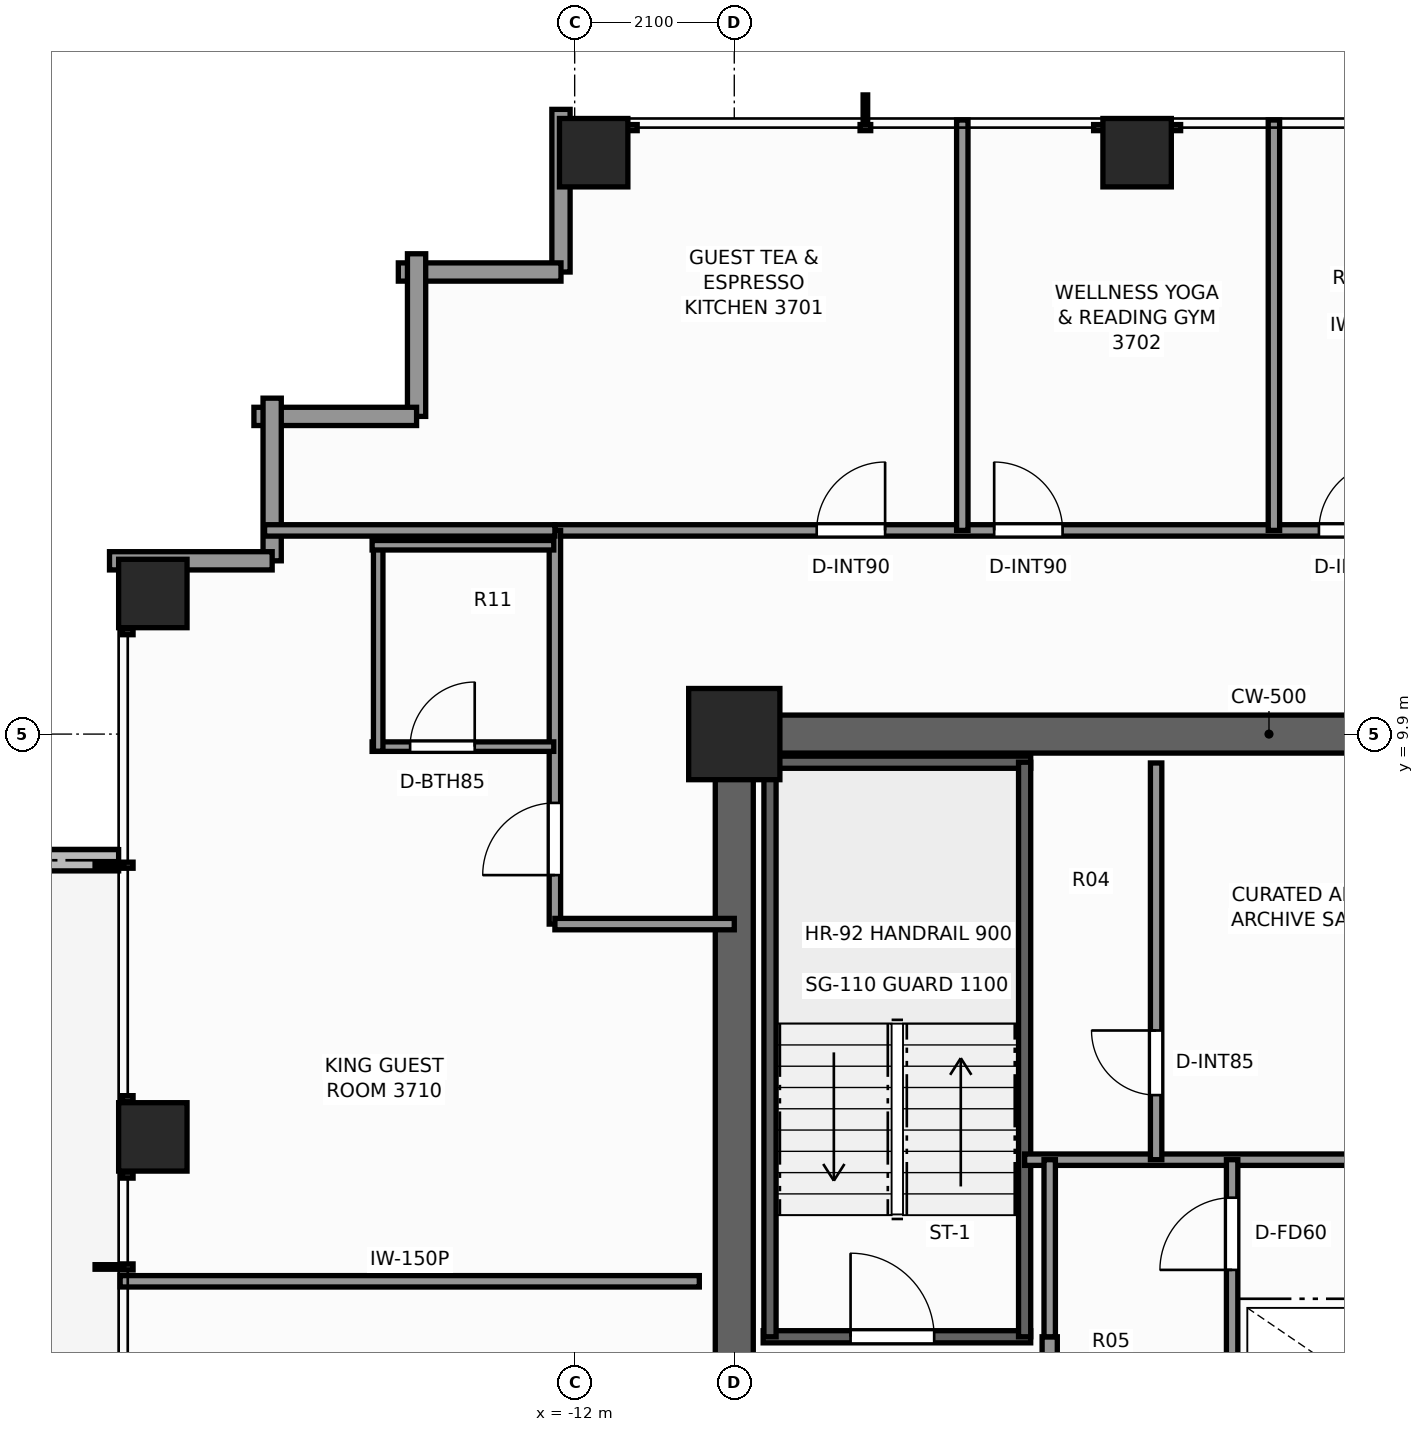
"""IFC4 building model, lengths in metres.
Left out: names, types, materials, properties, quantities, classifications, styles, units other than length and angle.
Written with IfcOpenShell. Run it as: python <this file> out.ifc"""

import sys

from ifc_helpers import new_model, si_unit, direction, frame, frame_2d, origin, origin_2d, place, context, subcontext, project, spatial, rectangle, extrude, element, fill, save


model = new_model("IFC4")
c1 = context("Model", 3, precision=1e-05, world=origin(), true_north=direction((0.0, 1.0)))
c2 = subcontext(c1, "Body", "Model", "MODEL_VIEW")
j1 = project(units=[si_unit("LENGTHUNIT", "METRE"), si_unit("PLANEANGLEUNIT", "RADIAN")], contexts=[c1])
p1 = place(None, origin())
s1 = spatial("IfcSite", under=j1, at=p1, CompositionType="ELEMENT")
p2 = place(p1, origin())
s2 = spatial("IfcBuilding", under=s1, at=p2, CompositionType="ELEMENT")
p3 = place(p2, frame((0.0, 0.0, 128.3)))
s3 = spatial("IfcBuildingStorey", under=s2, at=p3, CompositionType="ELEMENT", Elevation=128.3)
p4 = place(p3, frame((-10.15, 9.9, 0.0), z_axis=(0.0, 0.0, 1.0), x_axis=(1.0, 0.0, 0.0)))
e1 = element("IfcWall", 1, at=p4, inside=s3, PredefinedType="SHEAR", context=c2, shape_type="SweptSolid", body=[
    extrude(rectangle(XDim=14.57, YDim=0.5, at=frame_2d((7.285, 0.0))), origin(), (0.0, 0.0, 1.0), 3.3),
])
p5 = place(p3, frame((-9.9, -3.7, 0.0), z_axis=(0.0, 0.0, 1.0), x_axis=(0.0, 1.0, 0.0)))
e2 = element("IfcWall", 2, at=p5, inside=s3, PredefinedType="SHEAR", context=c2, shape_type="SweptSolid", body=[
    extrude(rectangle(XDim=13.35, YDim=0.5, at=frame_2d((6.675, 0.0))), origin(), (0.0, 0.0, 1.0), 3.3),
])
p6 = place(p5, frame((0.35, 0.0, 0.0)))
e3 = element("IfcOpeningElement", 3, at=p6, cuts=e2, PredefinedType="OPENING", context=c2, shape_type="SweptSolid", body=[
    extrude(rectangle(XDim=1.1, YDim=2.2, at=frame_2d((0.55, 1.1))), frame((0.0, 0.26, 0.0), z_axis=(0.0, -1.0, 0.0), x_axis=(1.0, 0.0, 0.0)), (0.0, 0.0, 1.0), 0.52),
])
p7 = place(p3, frame((-9.9, 9.9, 0.0), z_axis=(0.0, 0.0, 1.0), x_axis=(1.0, 0.0, 0.0)))
e4 = element("IfcColumn", 4, at=p7, inside=s3, PredefinedType="COLUMN", context=c2, shape_type="SweptSolid", body=[
    extrude(rectangle(XDim=1.2, YDim=1.2, at=origin_2d()), origin(), (0.0, 0.0, 1.0), 3.3),
])
for number, where, z_axis, x_axis in (
    (5, (-11.75, 17.55, 0.0), (0.0, 0.0, 1.0), (1.0, 0.0, 0.0)),
    (6, (-4.6, 17.55, 0.0), (0.0, 0.0, 1.0), (1.0, 0.0, 0.0)),
    (7, (-17.55, 4.6, 0.0), (0.0, 0.0, 1.0), (1.0, 0.0, 0.0)),
    (8, (-17.55, 11.75, 0.0), (0.0, 0.0, 1.0), (1.0, 0.0, 0.0)),
):
    element("IfcColumn", number, at=place(p3, frame(where, z_axis=z_axis, x_axis=x_axis)), inside=s3, PredefinedType="COLUMN", context=c2, shape_type="SweptSolid", body=[
        extrude(rectangle(XDim=0.9, YDim=0.9, at=origin_2d()), origin(), (0.0, 0.0, 1.0), 3.3),
    ])
p8 = place(p3, frame((-18.0, 8.24, -0.02), z_axis=(0.0, 0.0, 1.0), x_axis=(-1.0, 0.0, 0.0)))
e9 = element("IfcWall", 9, at=p8, inside=s3, PredefinedType="PARAPET", context=c2, shape_type="SweptSolid", body=[
    extrude(rectangle(XDim=2.006, YDim=0.28, at=frame_2d((1.003, 0.0))), origin(), (0.0, 0.0, 1.0), 0.42),
])
for number, where, z_axis, x_axis in (
    (10, (-12.18, 15.98, 0.0), (0.0, 0.0, 1.0), (0.0, 1.0, 0.0)),
    (11, (-14.32, 15.98, 0.0), (0.0, 0.0, 1.0), (1.0, 0.0, 0.0)),
):
    element("IfcWall", number, at=place(p3, frame(where, z_axis=z_axis, x_axis=x_axis)), inside=s3, PredefinedType="STANDARD", context=c2, shape_type="SweptSolid", body=[
        extrude(rectangle(XDim=2.14, YDim=0.24, at=frame_2d((1.07, 0.0))), origin(), (0.0, 0.0, 1.0), 2.479),
    ])
for number, where, z_axis, x_axis in (
    (12, (-14.08, 14.08, 0.0), (0.0, 0.0, 1.0), (0.0, 1.0, 0.0)),
    (13, (-16.22, 14.08, 0.0), (0.0, 0.0, 1.0), (1.0, 0.0, 0.0)),
):
    element("IfcWall", number, at=place(p3, frame(where, z_axis=z_axis, x_axis=x_axis)), inside=s3, PredefinedType="STANDARD", context=c2, shape_type="SweptSolid", body=[
        extrude(rectangle(XDim=2.14, YDim=0.24, at=frame_2d((1.07, 0.0))), origin(), (0.0, 0.0, 1.0), 2.479),
    ])
for number, where, z_axis, x_axis in (
    (14, (-15.98, 12.18, 0.0), (0.0, 0.0, 1.0), (0.0, 1.0, 0.0)),
    (15, (-18.12, 12.18, 0.0), (0.0, 0.0, 1.0), (1.0, 0.0, 0.0)),
):
    element("IfcWall", number, at=place(p3, frame(where, z_axis=z_axis, x_axis=x_axis)), inside=s3, PredefinedType="STANDARD", context=c2, shape_type="SweptSolid", body=[
        extrude(rectangle(XDim=2.14, YDim=0.24, at=frame_2d((1.07, 0.0))), origin(), (0.0, 0.0, 1.0), 2.479),
    ])
p9 = place(p3, frame((-9.52, 1.97, 0.0), z_axis=(0.0, 0.0, 1.0), x_axis=(1.0, 0.0, 0.0)))
e16 = element("IfcWall", 16, at=p9, inside=s3, PredefinedType="SHEAR", context=c2, shape_type="SweptSolid", body=[
    extrude(rectangle(XDim=3.52, YDim=0.16, at=frame_2d((1.76, 0.0))), origin(), (0.0, 0.0, 1.0), 3.3),
])
p10 = place(p9, frame((1.15, 0.0, 0.0)))
e17 = element("IfcOpeningElement", 17, at=p10, cuts=e16, PredefinedType="OPENING", context=c2, shape_type="SweptSolid", body=[
    extrude(rectangle(XDim=1.1, YDim=2.2, at=frame_2d((0.55, 1.1))), frame((0.0, 0.09, 0.0), z_axis=(0.0, -1.0, 0.0), x_axis=(1.0, 0.0, 0.0)), (0.0, 0.0, 1.0), 0.18),
])
p11 = place(p3, frame((-9.52, 9.53, 0.0), z_axis=(0.0, 0.0, 1.0), x_axis=(1.0, 0.0, 0.0)))
e18 = element("IfcWall", 18, at=p11, inside=s3, PredefinedType="SHEAR", context=c2, shape_type="SweptSolid", body=[
    extrude(rectangle(XDim=3.52, YDim=0.16, at=frame_2d((1.76, 0.0))), origin(), (0.0, 0.0, 1.0), 3.3),
])
for number, where, z_axis, x_axis in (
    (19, (-9.43, 1.97, 0.0), (0.0, 0.0, 1.0), (0.0, 1.0, 0.0)),
    (20, (-6.08, 1.97, 0.0), (0.0, 0.0, 1.0), (0.0, 1.0, 0.0)),
):
    element("IfcWall", number, at=place(p3, frame(where, z_axis=z_axis, x_axis=x_axis)), inside=s3, PredefinedType="SHEAR", context=c2, shape_type="SweptSolid", body=[
        extrude(rectangle(XDim=7.56, YDim=0.16, at=frame_2d((3.78, 0.0))), origin(), (0.0, 0.0, 1.0), 3.3),
    ])
p12 = place(p3, frame((-5.75, -3.6, 0.0), z_axis=(0.0, 0.0, 1.0), x_axis=(0.0, 1.0, 0.0)))
e21 = element("IfcWall", 21, at=p12, inside=s3, PredefinedType="SOLIDWALL", context=c2, shape_type="SweptSolid", body=[
    extrude(rectangle(XDim=5.57, YDim=0.2, at=frame_2d((2.785, 0.0))), origin(), (0.0, 0.0, 1.0), 2.735),
])
p13 = place(p12, frame((2.75, 0.0, 0.0)))
e22 = element("IfcOpeningElement", 22, at=p13, cuts=e21, PredefinedType="OPENING", context=c2, shape_type="SweptSolid", body=[
    extrude(rectangle(XDim=1.1, YDim=2.2, at=frame_2d((0.55, 1.1))), frame((0.0, 0.11, 0.0), z_axis=(0.0, -1.0, 0.0), x_axis=(1.0, 0.0, 0.0)), (0.0, 0.0, 1.0), 0.22),
])
p14 = place(p3, frame((-6.08, 4.3, 0.0), z_axis=(0.0, 0.0, 1.0), x_axis=(1.0, 0.0, 0.0)))
e23 = element("IfcWall", 23, at=p14, inside=s3, PredefinedType="PARTITIONING", context=c2, shape_type="SweptSolid", body=[
    extrude(rectangle(XDim=6.3, YDim=0.15, at=frame_2d((3.15, 0.0))), origin(), (0.0, 0.0, 1.0), 3.1),
])
p15 = place(p3, frame((-4.35, 4.3, 0.0), z_axis=(0.0, 0.0, 1.0), x_axis=(0.0, 1.0, 0.0)))
e24 = element("IfcWall", 24, at=p15, inside=s3, PredefinedType="PARTITIONING", context=c2, shape_type="SweptSolid", body=[
    extrude(rectangle(XDim=5.22, YDim=0.15, at=frame_2d((2.61, 0.0))), origin(), (0.0, 0.0, 1.0), 3.1),
])
p16 = place(p15, frame((0.85, 0.0, 0.0)))
e25 = element("IfcOpeningElement", 25, at=p16, cuts=e24, PredefinedType="OPENING", context=c2, shape_type="SweptSolid", body=[
    extrude(rectangle(XDim=0.85, YDim=2.03, at=frame_2d((0.425, 1.015))), frame((0.0, 0.085, 0.0), z_axis=(0.0, -1.0, 0.0), x_axis=(1.0, 0.0, 0.0)), (0.0, 0.0, 1.0), 0.17),
])
p17 = place(p3, frame((-3.35, 1.1, 0.0), z_axis=(0.0, 0.0, 1.0), x_axis=(0.0, 1.0, 0.0)))
e26 = element("IfcWall", 26, at=p17, inside=s3, PredefinedType="PARTITIONING", context=c2, shape_type="SweptSolid", body=[
    extrude(rectangle(XDim=3.2, YDim=0.15, at=frame_2d((1.6, 0.0))), origin(), (0.0, 0.0, 1.0), 2.735),
])
p18 = place(p17, frame((1.75, 0.0, 0.0)))
e27 = element("IfcOpeningElement", 27, at=p18, cuts=e26, PredefinedType="OPENING", context=c2, shape_type="SweptSolid", body=[
    extrude(rectangle(XDim=0.95, YDim=2.06, at=frame_2d((0.475, 1.03))), frame((0.0, 0.085, 0.0), z_axis=(0.0, -1.0, 0.0), x_axis=(1.0, 0.0, 0.0)), (0.0, 0.0, 1.0), 0.17),
])
p19 = place(p3, frame((-5.75, 1.97, 0.0), z_axis=(0.0, 0.0, 1.0), x_axis=(0.0, 1.0, 0.0)))
e28 = element("IfcWall", 28, at=p19, inside=s3, PredefinedType="PARTITIONING", context=c2, shape_type="SweptSolid", body=[
    extrude(rectangle(XDim=2.33, YDim=0.15, at=frame_2d((1.165, 0.0))), origin(), (0.0, 0.0, 1.0), 2.735),
])
p20 = place(p3, frame((-12.26, 12.58, 0.0), z_axis=(0.0, 0.0, 1.0), x_axis=(1.0, 0.0, 0.0)))
e29 = element("IfcWall", 29, at=p20, inside=s3, PredefinedType="PARTITIONING", context=c2, shape_type="SweptSolid", body=[
    extrude(rectangle(XDim=24.68, YDim=0.15, at=frame_2d((12.34, 0.0))), origin(), (0.0, 0.0, 1.0), 2.312),
])
p21 = place(p20, frame((3.444, 0.0, 0.0)))
e30 = element("IfcOpeningElement", 30, at=p21, cuts=e29, PredefinedType="OPENING", context=c2, shape_type="SweptSolid", body=[
    extrude(rectangle(XDim=0.9, YDim=2.06, at=frame_2d((0.45, 1.03))), frame((0.0, 0.085, 0.0), z_axis=(0.0, -1.0, 0.0), x_axis=(1.0, 0.0, 0.0)), (0.0, 0.0, 1.0), 0.17),
])
p22 = place(p20, frame((5.779, 0.0, 0.0)))
e31 = element("IfcOpeningElement", 31, at=p22, cuts=e29, PredefinedType="OPENING", context=c2, shape_type="SweptSolid", body=[
    extrude(rectangle(XDim=0.9, YDim=2.06, at=frame_2d((0.45, 1.03))), frame((0.0, 0.085, 0.0), z_axis=(0.0, -1.0, 0.0), x_axis=(1.0, 0.0, 0.0)), (0.0, 0.0, 1.0), 0.17),
])
p23 = place(p20, frame((10.052, 0.0, 0.0)))
e32 = element("IfcOpeningElement", 32, at=p23, cuts=e29, PredefinedType="OPENING", context=c2, shape_type="SweptSolid", body=[
    extrude(rectangle(XDim=0.9, YDim=2.06, at=frame_2d((0.45, 1.03))), frame((0.0, 0.085, 0.0), z_axis=(0.0, -1.0, 0.0), x_axis=(1.0, 0.0, 0.0)), (0.0, 0.0, 1.0), 0.17),
])
p24 = place(p20, frame((13.179, 0.0, 0.0)))
e33 = element("IfcOpeningElement", 33, at=p24, cuts=e29, PredefinedType="OPENING", context=c2, shape_type="SweptSolid", body=[
    extrude(rectangle(XDim=0.95, YDim=2.06, at=frame_2d((0.475, 1.03))), frame((0.0, 0.085, 0.0), z_axis=(0.0, -1.0, 0.0), x_axis=(1.0, 0.0, 0.0)), (0.0, 0.0, 1.0), 0.17),
])
p25 = place(p20, frame((16.518, 0.0, 0.0)))
e34 = element("IfcOpeningElement", 34, at=p25, cuts=e29, PredefinedType="OPENING", context=c2, shape_type="SweptSolid", body=[
    extrude(rectangle(XDim=0.9, YDim=2.06, at=frame_2d((0.45, 1.03))), frame((0.0, 0.085, 0.0), z_axis=(0.0, -1.0, 0.0), x_axis=(1.0, 0.0, 0.0)), (0.0, 0.0, 1.0), 0.17),
])
p26 = place(p20, frame((19.999, 0.0, 0.0)))
e35 = element("IfcOpeningElement", 35, at=p26, cuts=e29, PredefinedType="OPENING", context=c2, shape_type="SweptSolid", body=[
    extrude(rectangle(XDim=0.9, YDim=2.06, at=frame_2d((0.45, 1.03))), frame((0.0, 0.085, 0.0), z_axis=(0.0, -1.0, 0.0), x_axis=(1.0, 0.0, 0.0)), (0.0, 0.0, 1.0), 0.17),
])
p27 = place(p3, frame((-12.26, 7.4, 0.0), z_axis=(0.0, 0.0, 1.0), x_axis=(0.0, 1.0, 0.0)))
e36 = element("IfcWall", 36, at=p27, inside=s3, PredefinedType="PARTITIONING", context=c2, shape_type="SweptSolid", body=[
    extrude(rectangle(XDim=5.18, YDim=0.15, at=frame_2d((2.59, 0.0))), origin(), (0.0, 0.0, 1.0), 2.312),
])
p28 = place(p27, frame((0.645, 0.0, 0.0)))
e37 = element("IfcOpeningElement", 37, at=p28, cuts=e36, PredefinedType="OPENING", context=c2, shape_type="SweptSolid", body=[
    extrude(rectangle(XDim=0.95, YDim=2.06, at=frame_2d((0.475, 1.03))), frame((0.0, 0.085, 0.0), z_axis=(0.0, -1.0, 0.0), x_axis=(1.0, 0.0, 0.0)), (0.0, 0.0, 1.0), 0.17),
])
p29 = place(p3, frame((-12.26, 7.4, 0.0), z_axis=(0.0, 0.0, 1.0), x_axis=(1.0, 0.0, 0.0)))
e38 = element("IfcWall", 38, at=p29, inside=s3, PredefinedType="PARTITIONING", context=c2, shape_type="SweptSolid", body=[
    extrude(rectangle(XDim=2.36, YDim=0.15, at=frame_2d((1.18, 0.0))), origin(), (0.0, 0.0, 1.0), 3.1),
])
p30 = place(p3, frame((-16.08, 12.58, 0.0), z_axis=(0.0, 0.0, 1.0), x_axis=(1.0, 0.0, 0.0)))
e39 = element("IfcWall", 39, at=p30, inside=s3, PredefinedType="PARTITIONING", context=c2, shape_type="SweptSolid", body=[
    extrude(rectangle(XDim=3.82, YDim=0.15, at=frame_2d((1.91, 0.0))), origin(), (0.0, 0.0, 1.0), 3.1),
])
for number, where, z_axis, x_axis in (
    (40, (-6.9, 12.58, 0.0), (0.0, 0.0, 1.0), (0.0, 1.0, 0.0)),
    (41, (-2.8, 12.58, 0.0), (0.0, 0.0, 1.0), (0.0, 1.0, 0.0)),
):
    element("IfcWall", number, at=place(p3, frame(where, z_axis=z_axis, x_axis=x_axis)), inside=s3, PredefinedType="PARTITIONING", context=c2, shape_type="SweptSolid", body=[
        extrude(rectangle(XDim=5.4, YDim=0.15, at=frame_2d((2.7, 0.0))), origin(), (0.0, 0.0, 1.0), 2.469),
    ])
p31 = place(p3, frame((-17.98, 2.7, 0.0), z_axis=(0.0, 0.0, 1.0), x_axis=(1.0, 0.0, 0.0)))
e42 = element("IfcWall", 42, at=p31, inside=s3, PredefinedType="PARTITIONING", context=c2, shape_type="SweptSolid", body=[
    extrude(rectangle(XDim=7.62, YDim=0.15, at=frame_2d((3.81, 0.0))), origin(), (0.0, 0.0, 1.0), 2.469),
])
p32 = place(p3, frame((-14.665, 9.735, 0.0), z_axis=(0.0, 0.0, 1.0), x_axis=(1.0, 0.0, 0.0)))
e43 = element("IfcWall", 43, at=p32, inside=s3, PredefinedType="PARTITIONING", context=c2, shape_type="SweptSolid", body=[
    extrude(rectangle(XDim=2.39, YDim=0.125, at=frame_2d((1.195, 0.0))), origin(), (0.0, 0.0, 1.0), 3.1),
])
p33 = place(p32, frame((0.5, 0.0, 0.0)))
e44 = element("IfcOpeningElement", 44, at=p33, cuts=e43, PredefinedType="OPENING", context=c2, shape_type="SweptSolid", body=[
    extrude(rectangle(XDim=0.85, YDim=2.03, at=frame_2d((0.425, 1.015))), frame((0.0, 0.073, 0.0), z_axis=(0.0, -1.0, 0.0), x_axis=(1.0, 0.0, 0.0)), (0.0, 0.0, 1.0), 0.145),
])
p34 = place(p3, frame((-14.585, 9.675, 0.0), z_axis=(0.0, 0.0, 1.0), x_axis=(0.0, 1.0, 0.0)))
e45 = element("IfcWall", 45, at=p34, inside=s3, PredefinedType="PARTITIONING", context=c2, shape_type="SweptSolid", body=[
    extrude(rectangle(XDim=2.77, YDim=0.125, at=frame_2d((1.385, 0.0))), origin(), (0.0, 0.0, 1.0), 2.312),
])
p35 = place(p3, frame((-14.665, 12.385, 0.0), z_axis=(0.0, 0.0, 1.0), x_axis=(1.0, 0.0, 0.0)))
e46 = element("IfcWall", 46, at=p35, inside=s3, PredefinedType="PARTITIONING", context=c2, shape_type="SweptSolid", body=[
    extrude(rectangle(XDim=2.39, YDim=0.125, at=frame_2d((1.195, 0.0))), origin(), (0.0, 0.0, 1.0), 3.1),
])
p36 = place(p10, origin())
e47 = element("IfcDoor", 47, at=p36, inside=s3, OperationType="SINGLE_SWING_LEFT", PredefinedType="DOOR", context=c2, shape_type="SweptSolid", body=[
    extrude(rectangle(XDim=1.1, YDim=2.2, at=frame_2d((0.55, 1.1))), frame((0.0, 0.025, 0.0), z_axis=(0.0, -1.0, 0.0), x_axis=(1.0, 0.0, 0.0)), (0.0, 0.0, 1.0), 0.05),
])
fill(e17, e47)
p37 = place(p16, origin())
e48 = element("IfcDoor", 48, at=p37, inside=s3, OperationType="SINGLE_SWING_RIGHT", PredefinedType="DOOR", context=c2, shape_type="SweptSolid", body=[
    extrude(rectangle(XDim=0.85, YDim=2.03, at=frame_2d((0.425, 1.015))), frame((0.0, 0.025, 0.0), z_axis=(0.0, -1.0, 0.0), x_axis=(1.0, 0.0, 0.0)), (0.0, 0.0, 1.0), 0.05),
])
fill(e25, e48)
p38 = place(p18, origin())
e49 = element("IfcDoor", 49, at=p38, inside=s3, OperationType="SINGLE_SWING_LEFT", PredefinedType="DOOR", context=c2, shape_type="SweptSolid", body=[
    extrude(rectangle(XDim=0.95, YDim=2.06, at=frame_2d((0.475, 1.03))), frame((0.0, 0.025, 0.0), z_axis=(0.0, -1.0, 0.0), x_axis=(1.0, 0.0, 0.0)), (0.0, 0.0, 1.0), 0.05),
])
fill(e27, e49)
p39 = place(p21, origin())
e50 = element("IfcDoor", 50, at=p39, inside=s3, OperationType="SINGLE_SWING_RIGHT", PredefinedType="DOOR", context=c2, shape_type="SweptSolid", body=[
    extrude(rectangle(XDim=0.9, YDim=2.06, at=frame_2d((0.45, 1.03))), frame((0.0, 0.025, 0.0), z_axis=(0.0, -1.0, 0.0), x_axis=(1.0, 0.0, 0.0)), (0.0, 0.0, 1.0), 0.05),
])
fill(e30, e50)
p40 = place(p22, origin())
e51 = element("IfcDoor", 51, at=p40, inside=s3, OperationType="SINGLE_SWING_LEFT", PredefinedType="DOOR", context=c2, shape_type="SweptSolid", body=[
    extrude(rectangle(XDim=0.9, YDim=2.06, at=frame_2d((0.45, 1.03))), frame((0.0, 0.025, 0.0), z_axis=(0.0, -1.0, 0.0), x_axis=(1.0, 0.0, 0.0)), (0.0, 0.0, 1.0), 0.05),
])
fill(e31, e51)
p41 = place(p23, origin())
e52 = element("IfcDoor", 52, at=p41, inside=s3, OperationType="SINGLE_SWING_RIGHT", PredefinedType="DOOR", context=c2, shape_type="SweptSolid", body=[
    extrude(rectangle(XDim=0.9, YDim=2.06, at=frame_2d((0.45, 1.03))), frame((0.0, 0.025, 0.0), z_axis=(0.0, -1.0, 0.0), x_axis=(1.0, 0.0, 0.0)), (0.0, 0.0, 1.0), 0.05),
])
fill(e32, e52)
p42 = place(p33, origin())
e53 = element("IfcDoor", 53, at=p42, inside=s3, OperationType="SINGLE_SWING_RIGHT", PredefinedType="DOOR", context=c2, shape_type="SweptSolid", body=[
    extrude(rectangle(XDim=0.85, YDim=2.03, at=frame_2d((0.425, 1.015))), frame((0.0, 0.025, 0.0), z_axis=(0.0, -1.0, 0.0), x_axis=(1.0, 0.0, 0.0)), (0.0, 0.0, 1.0), 0.05),
])
fill(e44, e53)
p43 = place(p28, origin())
e54 = element("IfcDoor", 54, at=p43, inside=s3, OperationType="SINGLE_SWING_LEFT", PredefinedType="DOOR", context=c2, shape_type="SweptSolid", body=[
    extrude(rectangle(XDim=0.95, YDim=2.06, at=frame_2d((0.475, 1.03))), frame((0.0, 0.025, 0.0), z_axis=(0.0, -1.0, 0.0), x_axis=(1.0, 0.0, 0.0)), (0.0, 0.0, 1.0), 0.05),
])
fill(e37, e54)
save(model, sys.argv[1])
